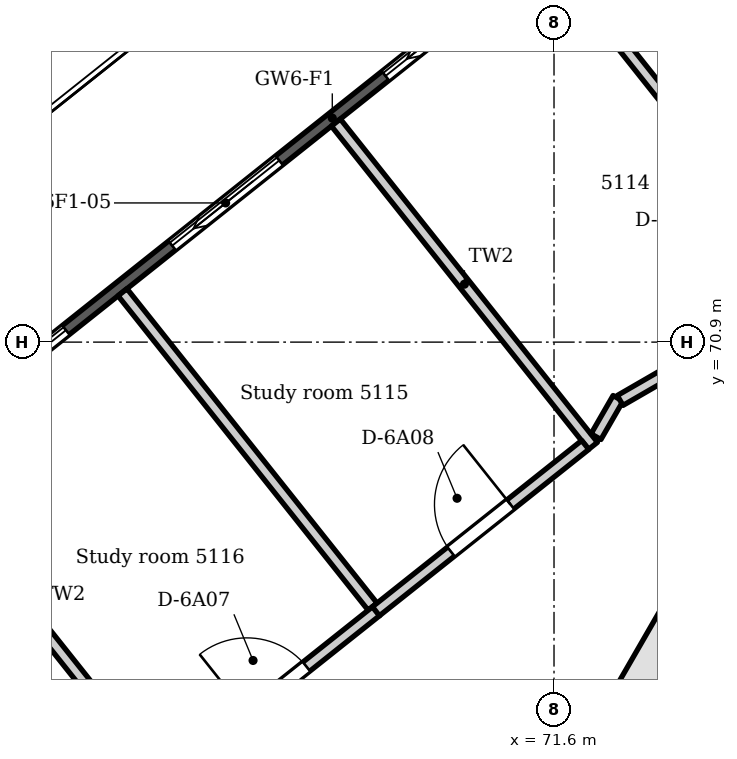
"""IFC4 building model, lengths in metres.
Left out: names, types, materials, properties, quantities, classifications, styles, units other than length and angle.
Written with IfcOpenShell. Run it as: python <this file> out.ifc"""

import sys

from ifc_helpers import new_model, si_unit, direction, frame, frame_2d, origin, place, context, subcontext, project, spatial, polyline, rectangle, outline, extrude, element, fill, save


model = new_model("IFC4")
c1 = context("Model", 3, precision=1e-05, world=origin(), true_north=direction((0.0, 1.0)))
c2 = subcontext(c1, "Body", "Model", "MODEL_VIEW")
j1 = project(units=[si_unit("LENGTHUNIT", "METRE"), si_unit("PLANEANGLEUNIT", "RADIAN")], contexts=[c1])
p1 = place(None, origin())
s1 = spatial("IfcSite", under=j1, at=p1, CompositionType="ELEMENT")
p2 = place(p1, origin())
s2 = spatial("IfcBuilding", under=s1, at=p2, CompositionType="ELEMENT")
p3 = place(p2, frame((0.0, 0.0, 198.0)))
s3 = spatial("IfcBuildingStorey", under=s2, at=p3, CompositionType="ELEMENT", Elevation=198.0)
p4 = place(p3, frame((74.081, 68.548, 0.0), z_axis=(0.0, 0.0, 1.0), x_axis=(-0.499983800959, -0.866034756103, 0.0)))
e1 = element("IfcWall", 1, at=p4, inside=s3, PredefinedType="SHEAR", context=c2, shape_type="SweptSolid", body=[
    extrude(outline(polyline([(0.0, -0.35), (4.555, -0.35), (4.368, 0.35), (0.188, 0.35), (0.0, -0.35)])), origin(), (0.0, 0.0, 1.0), 3.6),
])
p5 = place(p4, frame((1.077, 0.0, 0.0)))
e2 = element("IfcOpeningElement", 2, at=p5, cuts=e1, PredefinedType="OPENING", context=c2, shape_type="SweptSolid", body=[
    extrude(rectangle(XDim=2.4, YDim=2.1, at=frame_2d((1.2, 1.05))), frame((0.0, 0.36, 0.0), z_axis=(0.0, -1.0, 0.0), x_axis=(1.0, 0.0, 0.0)), (0.0, 0.0, 1.0), 0.72),
])
p6 = place(p3, frame((54.651, 62.686, 0.0), z_axis=(0.0, 0.0, 1.0), x_axis=(0.782609620341, 0.622512796776, 0.0)))
e3 = element("IfcWall", 3, at=p6, inside=s3, PredefinedType="SOLIDWALL", context=c2, shape_type="SweptSolid", body=[
    extrude(outline(polyline([(0.149, 0.075), (0.149, -0.075), (39.297, -0.075), (39.297, 0.075), (0.149, 0.075)])), origin(), (0.0, 0.0, 1.0), 3.3),
])
p7 = place(p6, frame((1.193, 0.0, 0.0)))
e4 = element("IfcOpeningElement", 4, at=p7, cuts=e3, PredefinedType="OPENING", context=c2, shape_type="SweptSolid", body=[
    extrude(rectangle(XDim=1.8, YDim=2.6, at=frame_2d((0.9, 1.3))), frame((0.0, 0.085, 0.0), z_axis=(0.0, -1.0, 0.0), x_axis=(1.0, 0.0, 0.0)), (0.0, 0.0, 1.0), 0.17),
])
p8 = place(p6, frame((4.479, 0.0, 0.0)))
e5 = element("IfcOpeningElement", 5, at=p8, cuts=e3, PredefinedType="OPENING", context=c2, shape_type="SweptSolid", body=[
    extrude(rectangle(XDim=1.8, YDim=2.6, at=frame_2d((0.9, 1.3))), frame((0.0, 0.085, 0.0), z_axis=(0.0, -1.0, 0.0), x_axis=(1.0, 0.0, 0.0)), (0.0, 0.0, 1.0), 0.17),
])
p9 = place(p6, frame((8.065, 0.0, 0.0)))
e6 = element("IfcOpeningElement", 6, at=p9, cuts=e3, PredefinedType="OPENING", context=c2, shape_type="SweptSolid", body=[
    extrude(rectangle(XDim=1.8, YDim=2.6, at=frame_2d((0.9, 1.3))), frame((0.0, 0.085, 0.0), z_axis=(0.0, -1.0, 0.0), x_axis=(1.0, 0.0, 0.0)), (0.0, 0.0, 1.0), 0.17),
])
p10 = place(p6, frame((11.651, 0.0, 0.0)))
e7 = element("IfcOpeningElement", 7, at=p10, cuts=e3, PredefinedType="OPENING", context=c2, shape_type="SweptSolid", body=[
    extrude(rectangle(XDim=1.8, YDim=2.6, at=frame_2d((0.9, 1.3))), frame((0.0, 0.085, 0.0), z_axis=(0.0, -1.0, 0.0), x_axis=(1.0, 0.0, 0.0)), (0.0, 0.0, 1.0), 0.17),
])
p11 = place(p6, frame((15.237, 0.0, 0.0)))
e8 = element("IfcOpeningElement", 8, at=p11, cuts=e3, PredefinedType="OPENING", context=c2, shape_type="SweptSolid", body=[
    extrude(rectangle(XDim=1.8, YDim=2.6, at=frame_2d((0.9, 1.3))), frame((0.0, 0.085, 0.0), z_axis=(0.0, -1.0, 0.0), x_axis=(1.0, 0.0, 0.0)), (0.0, 0.0, 1.0), 0.17),
])
p12 = place(p6, frame((18.823, 0.0, 0.0)))
e9 = element("IfcOpeningElement", 9, at=p12, cuts=e3, PredefinedType="OPENING", context=c2, shape_type="SweptSolid", body=[
    extrude(rectangle(XDim=1.8, YDim=2.6, at=frame_2d((0.9, 1.3))), frame((0.0, 0.085, 0.0), z_axis=(0.0, -1.0, 0.0), x_axis=(1.0, 0.0, 0.0)), (0.0, 0.0, 1.0), 0.17),
])
p13 = place(p6, frame((22.409, 0.0, 0.0)))
e10 = element("IfcOpeningElement", 10, at=p13, cuts=e3, PredefinedType="OPENING", context=c2, shape_type="SweptSolid", body=[
    extrude(rectangle(XDim=1.8, YDim=2.6, at=frame_2d((0.9, 1.3))), frame((0.0, 0.085, 0.0), z_axis=(0.0, -1.0, 0.0), x_axis=(1.0, 0.0, 0.0)), (0.0, 0.0, 1.0), 0.17),
])
p14 = place(p6, frame((25.995, 0.0, 0.0)))
e11 = element("IfcOpeningElement", 11, at=p14, cuts=e3, PredefinedType="OPENING", context=c2, shape_type="SweptSolid", body=[
    extrude(rectangle(XDim=1.8, YDim=2.6, at=frame_2d((0.9, 1.3))), frame((0.0, 0.085, 0.0), z_axis=(0.0, -1.0, 0.0), x_axis=(1.0, 0.0, 0.0)), (0.0, 0.0, 1.0), 0.17),
])
p15 = place(p6, frame((29.581, 0.0, 0.0)))
e12 = element("IfcOpeningElement", 12, at=p15, cuts=e3, PredefinedType="OPENING", context=c2, shape_type="SweptSolid", body=[
    extrude(rectangle(XDim=1.8, YDim=2.6, at=frame_2d((0.9, 1.3))), frame((0.0, 0.085, 0.0), z_axis=(0.0, -1.0, 0.0), x_axis=(1.0, 0.0, 0.0)), (0.0, 0.0, 1.0), 0.17),
])
p16 = place(p6, frame((33.167, 0.0, 0.0)))
e13 = element("IfcOpeningElement", 13, at=p16, cuts=e3, PredefinedType="OPENING", context=c2, shape_type="SweptSolid", body=[
    extrude(rectangle(XDim=1.8, YDim=2.6, at=frame_2d((0.9, 1.3))), frame((0.0, 0.085, 0.0), z_axis=(0.0, -1.0, 0.0), x_axis=(1.0, 0.0, 0.0)), (0.0, 0.0, 1.0), 0.17),
])
p17 = place(p6, frame((36.453, 0.0, 0.0)))
e14 = element("IfcOpeningElement", 14, at=p17, cuts=e3, PredefinedType="OPENING", context=c2, shape_type="SweptSolid", body=[
    extrude(rectangle(XDim=1.8, YDim=2.6, at=frame_2d((0.9, 1.3))), frame((0.0, 0.085, 0.0), z_axis=(0.0, -1.0, 0.0), x_axis=(1.0, 0.0, 0.0)), (0.0, 0.0, 1.0), 0.17),
])
p18 = place(p3, origin())
e15 = element("IfcWall", 15, at=p18, inside=s3, PredefinedType="PARAPET", context=c2, shape_type="SweptSolid", body=[
    extrude(outline(polyline([(75.979, 82.673), (46.956, 66.253), (47.255, 66.077), (74.479, 81.479), (75.979, 82.673)])), origin(), (0.0, 0.0, 1.0), 1.1),
])
p19 = place(p3, frame((63.117, 69.324, 0.0), z_axis=(0.0, 0.0, 1.0), x_axis=(0.622425914019, -0.7826787218, 0.0)))
e16 = element("IfcWall", 16, at=p19, inside=s3, PredefinedType="PARTITIONING", context=c2, shape_type="SweptSolid", body=[
    extrude(rectangle(XDim=5.36, YDim=0.15, at=frame_2d((2.68, 0.0))), origin(), (0.0, 0.0, 1.0), 3.3),
])
p20 = place(p3, frame((65.923, 71.556, 0.0), z_axis=(0.0, 0.0, 1.0), x_axis=(0.622585933561, -0.782551439416, 0.0)))
e17 = element("IfcWall", 17, at=p20, inside=s3, PredefinedType="PARTITIONING", context=c2, shape_type="SweptSolid", body=[
    extrude(rectangle(XDim=5.285, YDim=0.15, at=frame_2d((2.643, 0.0))), origin(), (0.0, 0.0, 1.0), 3.3),
])
p21 = place(p3, frame((66.643, 65.28, 0.0), z_axis=(0.0, 0.0, 1.0), x_axis=(0.782743987557, 0.622343835788, 0.0)))
e18 = element("IfcWall", 18, at=p21, inside=s3, PredefinedType="PARTITIONING", context=c2, shape_type="SweptSolid", body=[
    extrude(rectangle(XDim=3.347, YDim=0.15, at=frame_2d((1.673, 0.0))), origin(), (0.0, 0.0, 1.0), 3.3),
])
p22 = place(p21, frame((1.172, 0.0, 0.0)))
e19 = element("IfcOpeningElement", 19, at=p22, cuts=e18, PredefinedType="OPENING", context=c2, shape_type="SweptSolid", body=[
    extrude(rectangle(XDim=1.0, YDim=2.1, at=frame_2d((0.5, 1.05))), frame((0.0, 0.085, 0.0), z_axis=(0.0, -1.0, 0.0), x_axis=(1.0, 0.0, 0.0)), (0.0, 0.0, 1.0), 0.17),
])
p23 = place(p3, frame((68.73, 73.789, 0.0), z_axis=(0.0, 0.0, 1.0), x_axis=(0.622457280045, -0.782653776915, 0.0)))
e20 = element("IfcWall", 20, at=p23, inside=s3, PredefinedType="PARTITIONING", context=c2, shape_type="SweptSolid", body=[
    extrude(rectangle(XDim=5.435, YDim=0.15, at=frame_2d((2.717, 0.0))), origin(), (0.0, 0.0, 1.0), 3.3),
])
p24 = place(p3, frame((69.257, 67.359, 0.0), z_axis=(0.0, 0.0, 1.0), x_axis=(0.782922929563, 0.622118707615, 0.0)))
e21 = element("IfcWall", 21, at=p24, inside=s3, PredefinedType="PARTITIONING", context=c2, shape_type="SweptSolid", body=[
    extrude(rectangle(XDim=3.518, YDim=0.15, at=frame_2d((1.759, 0.0))), origin(), (0.0, 0.0, 1.0), 3.3),
])
p25 = place(p24, frame((1.261, 0.0, 0.0)))
e22 = element("IfcOpeningElement", 22, at=p25, cuts=e21, PredefinedType="OPENING", context=c2, shape_type="SweptSolid", body=[
    extrude(rectangle(XDim=1.0, YDim=2.1, at=frame_2d((0.5, 1.05))), frame((0.0, 0.085, 0.0), z_axis=(0.0, -1.0, 0.0), x_axis=(1.0, 0.0, 0.0)), (0.0, 0.0, 1.0), 0.17),
])
p26 = place(p3, frame((71.536, 76.021, 0.0), z_axis=(0.0, 0.0, 1.0), x_axis=(0.622565407695, -0.782567769041, 0.0)))
e23 = element("IfcWall", 23, at=p26, inside=s3, PredefinedType="PARTITIONING", context=c2, shape_type="SweptSolid", body=[
    extrude(rectangle(XDim=5.36, YDim=0.15, at=frame_2d((2.68, 0.0))), origin(), (0.0, 0.0, 1.0), 3.3),
])
p27 = place(p3, frame((72.152, 69.656, 0.0), z_axis=(0.0, 0.0, 1.0), x_axis=(0.499165076137, 0.866506910973, 0.0)))
e24 = element("IfcWall", 24, at=p27, inside=s3, PredefinedType="PARTITIONING", context=c2, shape_type="SweptSolid", body=[
    extrude(rectangle(XDim=0.582, YDim=0.15, at=frame_2d((0.291, 0.0))), origin(), (0.0, 0.0, 1.0), 3.3),
])
p28 = place(p3, frame((72.47, 70.133, 0.0), z_axis=(0.0, 0.0, 1.0), x_axis=(0.865861083349, 0.5002845034, 0.0)))
e25 = element("IfcWall", 25, at=p28, inside=s3, PredefinedType="PARTITIONING", context=c2, shape_type="SweptSolid", body=[
    extrude(rectangle(XDim=1.178, YDim=0.15, at=frame_2d((0.589, 0.0))), origin(), (0.0, 0.0, 1.0), 3.3),
])
p29 = place(p10, origin())
e26 = element("IfcDoor", 26, at=p29, inside=s3, OperationType="SLIDING_TO_LEFT", PredefinedType="DOOR", context=c2, shape_type="SweptSolid", body=[
    extrude(rectangle(XDim=1.8, YDim=2.6, at=frame_2d((0.9, 1.3))), frame((0.0, 0.025, 0.0), z_axis=(0.0, -1.0, 0.0), x_axis=(1.0, 0.0, 0.0)), (0.0, 0.0, 1.0), 0.05),
])
fill(e7, e26)
p30 = place(p11, origin())
e27 = element("IfcDoor", 27, at=p30, inside=s3, OperationType="SLIDING_TO_LEFT", PredefinedType="DOOR", context=c2, shape_type="SweptSolid", body=[
    extrude(rectangle(XDim=1.8, YDim=2.6, at=frame_2d((0.9, 1.3))), frame((0.0, 0.025, 0.0), z_axis=(0.0, -1.0, 0.0), x_axis=(1.0, 0.0, 0.0)), (0.0, 0.0, 1.0), 0.05),
])
fill(e8, e27)
p31 = place(p12, origin())
e28 = element("IfcDoor", 28, at=p31, inside=s3, OperationType="SLIDING_TO_LEFT", PredefinedType="DOOR", context=c2, shape_type="SweptSolid", body=[
    extrude(rectangle(XDim=1.8, YDim=2.6, at=frame_2d((0.9, 1.3))), frame((0.0, 0.025, 0.0), z_axis=(0.0, -1.0, 0.0), x_axis=(1.0, 0.0, 0.0)), (0.0, 0.0, 1.0), 0.05),
])
fill(e9, e28)
p32 = place(p22, origin())
e29 = element("IfcDoor", 29, at=p32, inside=s3, OperationType="SINGLE_SWING_LEFT", PredefinedType="DOOR", context=c2, shape_type="SweptSolid", body=[
    extrude(rectangle(XDim=1.0, YDim=2.1, at=frame_2d((0.5, 1.05))), frame((0.0, 0.025, 0.0), z_axis=(0.0, -1.0, 0.0), x_axis=(1.0, 0.0, 0.0)), (0.0, 0.0, 1.0), 0.05),
])
fill(e19, e29)
p33 = place(p25, origin())
e30 = element("IfcDoor", 30, at=p33, inside=s3, OperationType="SINGLE_SWING_RIGHT", PredefinedType="DOOR", context=c2, shape_type="SweptSolid", body=[
    extrude(rectangle(XDim=1.0, YDim=2.1, at=frame_2d((0.5, 1.05))), frame((0.0, 0.025, 0.0), z_axis=(0.0, -1.0, 0.0), x_axis=(1.0, 0.0, 0.0)), (0.0, 0.0, 1.0), 0.05),
])
fill(e22, e30)
p34 = place(p5, origin())
e31 = element("IfcDoor", 31, at=p34, inside=s3, OperationType="DOUBLE_DOOR_SINGLE_SWING", PredefinedType="DOOR", context=c2, shape_type="SweptSolid", body=[
    extrude(rectangle(XDim=2.4, YDim=2.1, at=frame_2d((1.2, 1.05))), frame((0.0, 0.025, 0.0), z_axis=(0.0, -1.0, 0.0), x_axis=(1.0, 0.0, 0.0)), (0.0, 0.0, 1.0), 0.05),
])
fill(e2, e31)
save(model, sys.argv[1])
